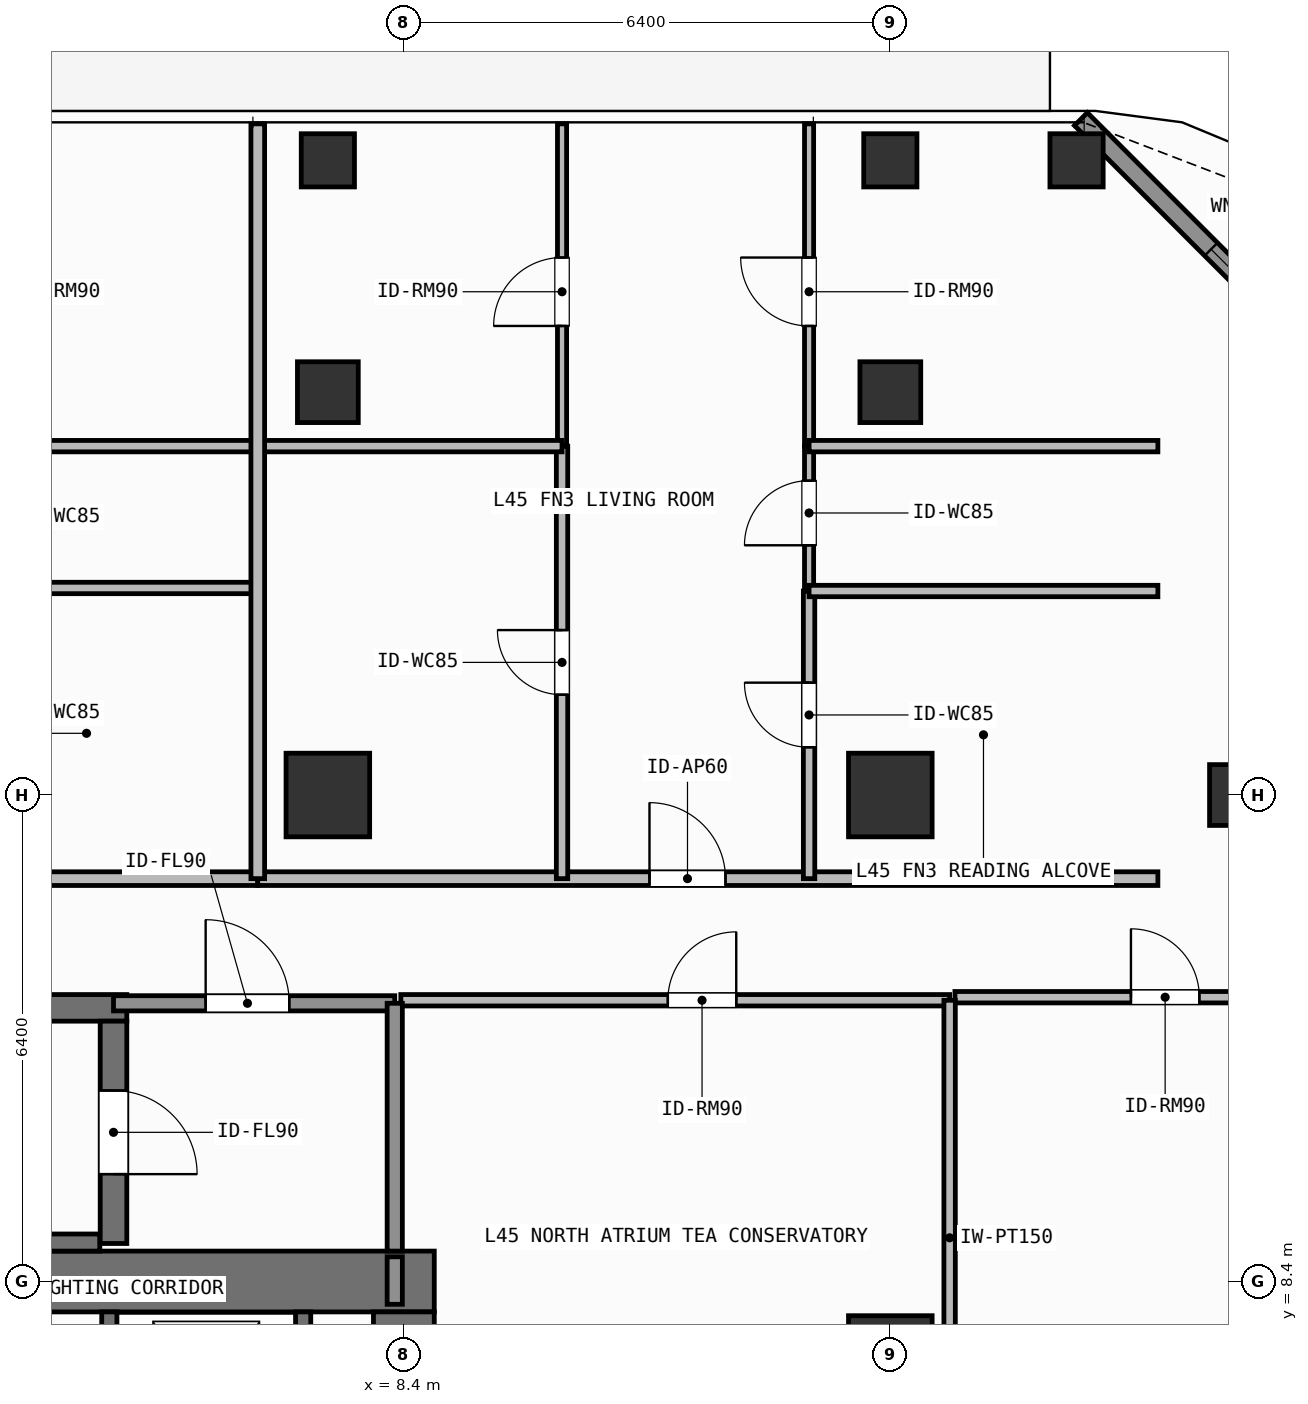
"""IFC4 building model, lengths in metres.
Left out: names, types, materials, properties, quantities, classifications, styles, units other than length and angle.
Written with IfcOpenShell. Run it as: python <this file> out.ifc"""

import sys

from ifc_helpers import new_model, si_unit, direction, frame, frame_2d, origin, origin_2d, place, context, subcontext, project, spatial, rectangle, hollow_rectangle, extrude, element, fill, save


model = new_model("IFC4")
c1 = context("Model", 3, precision=1e-05, world=origin(), true_north=direction((0.0, 1.0)))
c2 = subcontext(c1, "Body", "Model", "MODEL_VIEW")
j1 = project(units=[si_unit("LENGTHUNIT", "METRE"), si_unit("PLANEANGLEUNIT", "RADIAN")], contexts=[c1])
p1 = place(None, origin())
s1 = spatial("IfcSite", under=j1, at=p1, CompositionType="ELEMENT")
p2 = place(p1, origin())
s2 = spatial("IfcBuilding", under=s1, at=p2, CompositionType="ELEMENT")
p3 = place(p2, frame((0.0, 0.0, 183.6)))
s3 = spatial("IfcBuildingStorey", under=s2, at=p3, CompositionType="ELEMENT", Elevation=183.6)
p4 = place(p3, frame((-7.55, 8.4, 0.0), z_axis=(0.0, 0.0, 1.0), x_axis=(1.0, 0.0, 0.0)))
e1 = element("IfcWall", 1, at=p4, inside=s3, PredefinedType="SHEAR", context=c2, shape_type="SweptSolid", body=[
    extrude(rectangle(XDim=16.35, YDim=0.8, at=frame_2d((8.175, 0.0))), origin(), (0.0, 0.0, 1.0), 3.9),
])
p5 = place(p3, frame((8.4, 5.825, 0.0), z_axis=(0.0, 0.0, 1.0), x_axis=(0.0, 1.0, 0.0)))
e2 = element("IfcWall", 2, at=p5, inside=s3, PredefinedType="SHEAR", context=c2, shape_type="SweptSolid", body=[
    extrude(rectangle(XDim=2.175, YDim=0.8, at=frame_2d((1.087, 0.0))), origin(), (0.0, 0.0, 1.0), 3.9),
])
p6 = place(p3, frame((-2.555, 12.0, 0.0), z_axis=(0.0, 0.0, 1.0), x_axis=(1.0, 0.0, 0.0)))
e3 = element("IfcWall", 3, at=p6, inside=s3, PredefinedType="SHEAR", context=c2, shape_type="SweptSolid", body=[
    extrude(rectangle(XDim=7.31, YDim=0.35, at=frame_2d((3.655, 0.0))), origin(), (0.0, 0.0, 1.0), 3.9),
])
p7 = place(p3, frame((-2.2, 8.913, 0.0), z_axis=(0.0, 0.0, 1.0), x_axis=(1.0, 0.0, 0.0)))
e4 = element("IfcWall", 4, at=p7, inside=s3, PredefinedType="SHEAR", context=c2, shape_type="SweptSolid", body=[
    extrude(rectangle(XDim=6.6, YDim=0.225, at=frame_2d((3.3, 0.0))), origin(), (0.0, 0.0, 1.0), 3.9),
])
p8 = place(p3, frame((4.58, 11.825, 0.0), z_axis=(0.0, 0.0, 1.0), x_axis=(0.0, -1.0, 0.0)))
e5 = element("IfcWall", 5, at=p8, inside=s3, PredefinedType="SHEAR", context=c2, shape_type="SweptSolid", body=[
    extrude(rectangle(XDim=2.925, YDim=0.35, at=frame_2d((1.462, 0.0))), origin(), (0.0, 0.0, 1.0), 3.9),
])
p9 = place(p8, frame((0.913, 0.0, 0.0)))
e6 = element("IfcOpeningElement", 6, at=p9, cuts=e5, PredefinedType="OPENING", context=c2, shape_type="SweptSolid", body=[
    extrude(rectangle(XDim=1.1, YDim=2.15, at=frame_2d((0.55, 1.075))), frame((0.0, 0.185, 0.0), z_axis=(0.0, -1.0, 0.0), x_axis=(1.0, 0.0, 0.0)), (0.0, 0.0, 1.0), 0.37),
])
for number, where, z_axis, x_axis in (
    (7, (7.4, 14.8, 0.0), (0.0, 0.0, 1.0), (1.0, 0.0, 0.0)),
    (8, (14.8, 14.8, 0.0), (0.0, 0.0, 1.0), (1.0, 0.0, 0.0)),
    (9, (14.8, 7.4, 0.0), (0.0, 0.0, 1.0), (1.0, 0.0, 0.0)),
):
    element("IfcColumn", number, at=place(p3, frame(where, z_axis=z_axis, x_axis=x_axis)), inside=s3, PredefinedType="COLUMN", context=c2, shape_type="SweptSolid", body=[
        extrude(rectangle(XDim=1.1, YDim=1.1, at=origin_2d()), origin(), (0.0, 0.0, 1.0), 3.9),
    ])
for number, where, z_axis, x_axis in (
    (10, (19.4, 14.8, 0.0), (0.0, 0.0, 1.0), (1.0, 0.0, 0.0)),
    (11, (7.4, 20.1, 0.0), (0.0, 0.0, 1.0), (1.0, 0.0, 0.0)),
    (12, (14.8, 20.1, 0.0), (0.0, 0.0, 1.0), (1.0, 0.0, 0.0)),
):
    element("IfcColumn", number, at=place(p3, frame(where, z_axis=z_axis, x_axis=x_axis)), inside=s3, PredefinedType="COLUMN", context=c2, shape_type="SweptSolid", body=[
        extrude(hollow_rectangle(XDim=0.8, YDim=0.8, WallThickness=0.036, at=origin_2d()), origin(), (0.0, 0.0, 1.0), 3.9),
    ])
for number, where, z_axis, x_axis in (
    (13, (17.25, 23.15, 0.0), (0.0, 0.0, 1.0), (1.0, 0.0, 0.0)),
    (14, (7.4, 23.15, 0.0), (0.0, 0.0, 1.0), (1.0, 0.0, 0.0)),
    (15, (14.8, 23.15, 0.0), (0.0, 0.0, 1.0), (1.0, 0.0, 0.0)),
):
    element("IfcColumn", number, at=place(p3, frame(where, z_axis=z_axis, x_axis=x_axis)), inside=s3, PredefinedType="COLUMN", context=c2, shape_type="SweptSolid", body=[
        extrude(hollow_rectangle(XDim=0.7, YDim=0.7, WallThickness=0.032, at=origin_2d()), origin(), (0.0, 0.0, 1.0), 3.9),
    ])
p10 = place(p3, frame((17.308, 23.692, 0.0), z_axis=(0.0, 0.0, 1.0), x_axis=(0.707106781187, -0.707106781187, 0.0)))
e16 = element("IfcWall", 16, at=p10, inside=s3, PredefinedType="SOLIDWALL", context=c2, shape_type="SweptSolid", body=[
    extrude(rectangle(XDim=6.343, YDim=0.24, at=frame_2d((3.171, 0.0))), origin(), (0.0, 0.0, 1.0), 3.68),
])
p11 = place(p10, frame((2.421, 0.0, 0.8)))
e17 = element("IfcOpeningElement", 17, at=p11, cuts=e16, PredefinedType="OPENING", context=c2, shape_type="SweptSolid", body=[
    extrude(rectangle(XDim=1.5, YDim=1.85, at=frame_2d((0.75, 0.925))), frame((0.0, 0.13, 0.0), z_axis=(0.0, -1.0, 0.0), x_axis=(1.0, 0.0, 0.0)), (0.0, 0.0, 1.0), 0.26),
])
p12 = place(p3, frame((4.525, 5.825, 0.0), z_axis=(0.0, 0.0, 1.0), x_axis=(0.0, 1.0, 0.0)))
e18 = element("IfcWall", 18, at=p12, inside=s3, PredefinedType="SHEAR", context=c2, shape_type="SweptSolid", body=[
    extrude(rectangle(XDim=2.175, YDim=0.2, at=frame_2d((1.087, 0.0))), origin(), (0.0, 0.0, 1.0), 3.68),
])
p13 = place(p12, frame((0.425, 0.0, 0.0)))
e19 = element("IfcOpeningElement", 19, at=p13, cuts=e18, PredefinedType="OPENING", context=c2, shape_type="SweptSolid", body=[
    extrude(rectangle(XDim=1.1, YDim=2.2, at=frame_2d((0.55, 1.1))), frame((0.0, 0.11, 0.0), z_axis=(0.0, -1.0, 0.0), x_axis=(1.0, 0.0, 0.0)), (0.0, 0.0, 1.0), 0.22),
])
p14 = place(p3, frame((7.075, 5.825, 0.0), z_axis=(0.0, 0.0, 1.0), x_axis=(0.0, 1.0, 0.0)))
e20 = element("IfcWall", 20, at=p14, inside=s3, PredefinedType="SHEAR", context=c2, shape_type="SweptSolid", body=[
    extrude(rectangle(XDim=2.175, YDim=0.2, at=frame_2d((1.087, 0.0))), origin(), (0.0, 0.0, 1.0), 3.68),
])
p15 = place(p3, frame((4.58, 12.06, 0.0), z_axis=(0.0, 0.0, 1.0), x_axis=(1.0, 0.0, 0.0)))
e21 = element("IfcWall", 21, at=p15, inside=s3, PredefinedType="SOLIDWALL", context=c2, shape_type="SweptSolid", body=[
    extrude(rectangle(XDim=3.7, YDim=0.2, at=frame_2d((1.85, 0.0))), origin(), (0.0, 0.0, 1.0), 3.68),
])
p16 = place(p15, frame((1.212, 0.0, 0.0)))
e22 = element("IfcOpeningElement", 22, at=p16, cuts=e21, PredefinedType="OPENING", context=c2, shape_type="SweptSolid", body=[
    extrude(rectangle(XDim=1.1, YDim=2.15, at=frame_2d((0.55, 1.075))), frame((0.0, 0.11, 0.0), z_axis=(0.0, -1.0, 0.0), x_axis=(1.0, 0.0, 0.0)), (0.0, 0.0, 1.0), 0.22),
])
p17 = place(p3, frame((8.36, 12.1, 0.0), z_axis=(0.0, 0.0, 1.0), x_axis=(1.0, 0.0, 0.0)))
e23 = element("IfcWall", 23, at=p17, inside=s3, PredefinedType="PARTITIONING", context=c2, shape_type="SweptSolid", body=[
    extrude(rectangle(XDim=7.22, YDim=0.15, at=frame_2d((3.61, 0.0))), origin(), (0.0, 0.0, 1.0), 3.68),
])
p18 = place(p17, frame((3.513, 0.0, 0.0)))
e24 = element("IfcOpeningElement", 24, at=p18, cuts=e23, PredefinedType="OPENING", context=c2, shape_type="SweptSolid", body=[
    extrude(rectangle(XDim=0.9, YDim=2.1, at=frame_2d((0.45, 1.05))), frame((0.0, 0.085, 0.0), z_axis=(0.0, -1.0, 0.0), x_axis=(1.0, 0.0, 0.0)), (0.0, 0.0, 1.0), 0.17),
])
p19 = place(p3, frame((-12.28, 13.7, 0.0), z_axis=(0.0, 0.0, 1.0), x_axis=(1.0, 0.0, 0.0)))
e25 = element("IfcWall", 25, at=p19, inside=s3, PredefinedType="PARTITIONING", context=c2, shape_type="SweptSolid", body=[
    extrude(rectangle(XDim=18.758, YDim=0.18, at=frame_2d((9.379, 0.0))), origin(), (0.0, 0.0, 1.0), 3.68),
])
p20 = place(p19, frame((10.048, 0.0, 0.0)))
e26 = element("IfcOpeningElement", 26, at=p20, cuts=e25, PredefinedType="OPENING", context=c2, shape_type="SweptSolid", body=[
    extrude(rectangle(XDim=1.0, YDim=2.2, at=frame_2d((0.5, 1.1))), frame((0.0, 0.1, 0.0), z_axis=(0.0, -1.0, 0.0), x_axis=(1.0, 0.0, 0.0)), (0.0, 0.0, 1.0), 0.2),
])
p21 = place(p3, frame((6.478, 13.7, 0.0), z_axis=(0.0, 0.0, 1.0), x_axis=(1.0, 0.0, 0.0)))
e27 = element("IfcWall", 27, at=p21, inside=s3, PredefinedType="PARTITIONING", context=c2, shape_type="SweptSolid", body=[
    extrude(rectangle(XDim=11.842, YDim=0.18, at=frame_2d((5.921, 0.0))), origin(), (0.0, 0.0, 1.0), 3.68),
])
p22 = place(p21, frame((5.154, 0.0, 0.0)))
e28 = element("IfcOpeningElement", 28, at=p22, cuts=e27, PredefinedType="OPENING", context=c2, shape_type="SweptSolid", body=[
    extrude(rectangle(XDim=1.0, YDim=2.2, at=frame_2d((0.5, 1.1))), frame((0.0, 0.1, 0.0), z_axis=(0.0, -1.0, 0.0), x_axis=(1.0, 0.0, 0.0)), (0.0, 0.0, 1.0), 0.2),
])
p23 = place(p3, frame((10.481, 13.7, 0.0), z_axis=(0.0, 0.0, 1.0), x_axis=(0.0, 1.0, 0.0)))
e29 = element("IfcWall", 29, at=p23, inside=s3, PredefinedType="PARTITIONING", context=c2, shape_type="SweptSolid", body=[
    extrude(rectangle(XDim=5.69, YDim=0.15, at=frame_2d((2.845, 0.0))), origin(), (0.0, 0.0, 1.0), 3.68),
])
p24 = place(p23, frame((2.42, 0.0, 0.0)))
e30 = element("IfcOpeningElement", 30, at=p24, cuts=e29, PredefinedType="OPENING", context=c2, shape_type="SweptSolid", body=[
    extrude(rectangle(XDim=0.85, YDim=2.1, at=frame_2d((0.425, 1.05))), frame((0.0, 0.085, 0.0), z_axis=(0.0, -1.0, 0.0), x_axis=(1.0, 0.0, 0.0)), (0.0, 0.0, 1.0), 0.17),
])
p25 = place(p3, frame((10.481, 19.39, 0.0), z_axis=(0.0, 0.0, 1.0), x_axis=(0.0, 1.0, 0.0)))
e31 = element("IfcWall", 31, at=p25, inside=s3, PredefinedType="PARTITIONING", context=c2, shape_type="SweptSolid", body=[
    extrude(rectangle(XDim=4.24, YDim=0.12, at=frame_2d((2.12, 0.0))), origin(), (0.0, 0.0, 1.0), 3.68),
])
p26 = place(p25, frame((1.581, 0.0, 0.0)))
e32 = element("IfcOpeningElement", 32, at=p26, cuts=e31, PredefinedType="OPENING", context=c2, shape_type="SweptSolid", body=[
    extrude(rectangle(XDim=0.9, YDim=2.1, at=frame_2d((0.45, 1.05))), frame((0.0, 0.07, 0.0), z_axis=(0.0, -1.0, 0.0), x_axis=(1.0, 0.0, 0.0)), (0.0, 0.0, 1.0), 0.14),
])
p27 = place(p3, frame((13.731, 13.7, 0.0), z_axis=(0.0, 0.0, 1.0), x_axis=(0.0, 1.0, 0.0)))
e33 = element("IfcWall", 33, at=p27, inside=s3, PredefinedType="PARTITIONING", context=c2, shape_type="SweptSolid", body=[
    extrude(rectangle(XDim=3.784, YDim=0.15, at=frame_2d((1.892, 0.0))), origin(), (0.0, 0.0, 1.0), 3.68),
])
p28 = place(p27, frame((1.729, 0.0, 0.0)))
e34 = element("IfcOpeningElement", 34, at=p28, cuts=e33, PredefinedType="OPENING", context=c2, shape_type="SweptSolid", body=[
    extrude(rectangle(XDim=0.85, YDim=2.1, at=frame_2d((0.425, 1.05))), frame((0.0, 0.085, 0.0), z_axis=(0.0, -1.0, 0.0), x_axis=(1.0, 0.0, 0.0)), (0.0, 0.0, 1.0), 0.17),
])
p29 = place(p3, frame((13.731, 17.484, 0.0), z_axis=(0.0, 0.0, 1.0), x_axis=(0.0, 1.0, 0.0)))
e35 = element("IfcWall", 35, at=p29, inside=s3, PredefinedType="PARTITIONING", context=c2, shape_type="SweptSolid", body=[
    extrude(rectangle(XDim=1.906, YDim=0.12, at=frame_2d((0.953, 0.0))), origin(), (0.0, 0.0, 1.0), 3.68),
])
p30 = place(p29, frame((0.602, 0.0, 0.0)))
e36 = element("IfcOpeningElement", 36, at=p30, cuts=e35, PredefinedType="OPENING", context=c2, shape_type="SweptSolid", body=[
    extrude(rectangle(XDim=0.85, YDim=2.1, at=frame_2d((0.425, 1.05))), frame((0.0, 0.07, 0.0), z_axis=(0.0, -1.0, 0.0), x_axis=(1.0, 0.0, 0.0)), (0.0, 0.0, 1.0), 0.14),
])
p31 = place(p3, frame((13.731, 19.39, 0.0), z_axis=(0.0, 0.0, 1.0), x_axis=(0.0, 1.0, 0.0)))
e37 = element("IfcWall", 37, at=p31, inside=s3, PredefinedType="PARTITIONING", context=c2, shape_type="SweptSolid", body=[
    extrude(rectangle(XDim=4.24, YDim=0.12, at=frame_2d((2.12, 0.0))), origin(), (0.0, 0.0, 1.0), 3.68),
])
p32 = place(p31, frame((1.581, 0.0, 0.0)))
e38 = element("IfcOpeningElement", 38, at=p32, cuts=e37, PredefinedType="OPENING", context=c2, shape_type="SweptSolid", body=[
    extrude(rectangle(XDim=0.9, YDim=2.1, at=frame_2d((0.45, 1.05))), frame((0.0, 0.07, 0.0), z_axis=(0.0, -1.0, 0.0), x_axis=(1.0, 0.0, 0.0)), (0.0, 0.0, 1.0), 0.14),
])
p33 = place(p3, frame((15.65, 12.14, 0.0), z_axis=(0.0, 0.0, 1.0), x_axis=(1.0, 0.0, 0.0)))
e39 = element("IfcWall", 39, at=p33, inside=s3, PredefinedType="PARTITIONING", context=c2, shape_type="SweptSolid", body=[
    extrude(rectangle(XDim=6.07, YDim=0.15, at=frame_2d((3.035, 0.0))), origin(), (0.0, 0.0, 1.0), 3.68),
])
p34 = place(p33, frame((2.316, 0.0, 0.0)))
e40 = element("IfcOpeningElement", 40, at=p34, cuts=e39, PredefinedType="OPENING", context=c2, shape_type="SweptSolid", body=[
    extrude(rectangle(XDim=0.9, YDim=2.1, at=frame_2d((0.45, 1.05))), frame((0.0, 0.085, 0.0), z_axis=(0.0, -1.0, 0.0), x_axis=(1.0, 0.0, 0.0)), (0.0, 0.0, 1.0), 0.17),
])
p35 = place(p3, frame((8.28, 8.8, 0.0), z_axis=(0.0, 0.0, 1.0), x_axis=(0.0, 1.0, 0.0)))
e41 = element("IfcWall", 41, at=p35, inside=s3, PredefinedType="SOLIDWALL", context=c2, shape_type="SweptSolid", body=[
    extrude(rectangle(XDim=3.26, YDim=0.2, at=frame_2d((1.63, 0.0))), origin(), (0.0, 0.0, 1.0), 3.68),
])
p36 = place(p3, frame((8.28, 8.1, 0.0), z_axis=(0.0, 0.0, 1.0), x_axis=(0.0, 1.0, 0.0)))
e42 = element("IfcWall", 42, at=p36, inside=s3, PredefinedType="SOLIDWALL", context=c2, shape_type="SweptSolid", body=[
    extrude(rectangle(XDim=0.625, YDim=0.2, at=frame_2d((0.312, 0.0))), origin(), (0.0, 0.0, 1.0), 3.68),
])
p37 = place(p3, frame((15.58, 5.85, 0.0), z_axis=(0.0, 0.0, 1.0), x_axis=(0.0, 1.0, 0.0)))
e43 = element("IfcWall", 43, at=p37, inside=s3, PredefinedType="PARTITIONING", context=c2, shape_type="SweptSolid", body=[
    extrude(rectangle(XDim=6.25, YDim=0.15, at=frame_2d((3.125, 0.0))), origin(), (0.0, 0.0, 1.0), 3.68),
])
for number, where, z_axis, x_axis in (
    (44, (1.972, 17.524, 0.0), (0.0, 0.0, 1.0), (1.0, 0.0, 0.0)),
    (45, (1.972, 19.39, 0.0), (0.0, 0.0, 1.0), (1.0, 0.0, 0.0)),
):
    element("IfcWall", number, at=place(p3, frame(where, z_axis=z_axis, x_axis=x_axis)), inside=s3, PredefinedType="PARTITIONING", context=c2, shape_type="SweptSolid", body=[
        extrude(rectangle(XDim=4.506, YDim=0.15, at=frame_2d((2.253, 0.0))), origin(), (0.0, 0.0, 1.0), 3.68),
    ])
p38 = place(p3, frame((6.478, 19.39, 0.0), z_axis=(0.0, 0.0, 1.0), x_axis=(1.0, 0.0, 0.0)))
e46 = element("IfcWall", 46, at=p38, inside=s3, PredefinedType="PARTITIONING", context=c2, shape_type="SweptSolid", body=[
    extrude(rectangle(XDim=4.003, YDim=0.15, at=frame_2d((2.001, 0.0))), origin(), (0.0, 0.0, 1.0), 3.68),
])
for number, where, z_axis, x_axis in (
    (47, (13.731, 17.484, 0.0), (0.0, 0.0, 1.0), (1.0, 0.0, 0.0)),
    (48, (13.731, 19.39, 0.0), (0.0, 0.0, 1.0), (1.0, 0.0, 0.0)),
):
    element("IfcWall", number, at=place(p3, frame(where, z_axis=z_axis, x_axis=x_axis)), inside=s3, PredefinedType="PARTITIONING", context=c2, shape_type="SweptSolid", body=[
        extrude(rectangle(XDim=4.589, YDim=0.15, at=frame_2d((2.294, 0.0))), origin(), (0.0, 0.0, 1.0), 3.68),
    ])
p39 = place(p3, frame((6.478, 13.7, 0.0), z_axis=(0.0, 0.0, 1.0), x_axis=(0.0, 1.0, 0.0)))
e49 = element("IfcWall", 49, at=p39, inside=s3, PredefinedType="PARTITIONING", context=c2, shape_type="SweptSolid", body=[
    extrude(rectangle(XDim=9.93, YDim=0.18, at=frame_2d((4.965, 0.0))), origin(), (0.0, 0.0, 1.0), 3.68),
])
p40 = place(p11, origin())
e50 = element("IfcWindow", 50, at=p40, inside=s3, PartitioningType="SINGLE_PANEL", PredefinedType="WINDOW", context=c2, shape_type="SweptSolid", body=[
    extrude(rectangle(XDim=1.5, YDim=1.85, at=frame_2d((0.75, 0.925))), frame((0.0, 0.03, 0.0), z_axis=(0.0, -1.0, 0.0), x_axis=(1.0, 0.0, 0.0)), (0.0, 0.0, 1.0), 0.06),
])
fill(e17, e50)
p41 = place(p9, origin())
e51 = element("IfcDoor", 51, at=p41, inside=s3, OperationType="SINGLE_SWING_RIGHT", PredefinedType="DOOR", context=c2, shape_type="SweptSolid", body=[
    extrude(rectangle(XDim=1.1, YDim=2.15, at=frame_2d((0.55, 1.075))), frame((0.0, 0.025, 0.0), z_axis=(0.0, -1.0, 0.0), x_axis=(1.0, 0.0, 0.0)), (0.0, 0.0, 1.0), 0.05),
])
fill(e6, e51)
p42 = place(p16, origin())
e52 = element("IfcDoor", 52, at=p42, inside=s3, OperationType="SINGLE_SWING_LEFT", PredefinedType="DOOR", context=c2, shape_type="SweptSolid", body=[
    extrude(rectangle(XDim=1.1, YDim=2.15, at=frame_2d((0.55, 1.075))), frame((0.0, 0.025, 0.0), z_axis=(0.0, -1.0, 0.0), x_axis=(1.0, 0.0, 0.0)), (0.0, 0.0, 1.0), 0.05),
])
fill(e22, e52)
p43 = place(p18, origin())
e53 = element("IfcDoor", 53, at=p43, inside=s3, OperationType="SINGLE_SWING_RIGHT", PredefinedType="DOOR", context=c2, shape_type="SweptSolid", body=[
    extrude(rectangle(XDim=0.9, YDim=2.1, at=frame_2d((0.45, 1.05))), frame((0.0, 0.025, 0.0), z_axis=(0.0, -1.0, 0.0), x_axis=(1.0, 0.0, 0.0)), (0.0, 0.0, 1.0), 0.05),
])
fill(e24, e53)
p44 = place(p22, origin())
e54 = element("IfcDoor", 54, at=p44, inside=s3, OperationType="SINGLE_SWING_LEFT", PredefinedType="DOOR", context=c2, shape_type="SweptSolid", body=[
    extrude(rectangle(XDim=1.0, YDim=2.2, at=frame_2d((0.5, 1.1))), frame((0.0, 0.025, 0.0), z_axis=(0.0, -1.0, 0.0), x_axis=(1.0, 0.0, 0.0)), (0.0, 0.0, 1.0), 0.05),
])
fill(e28, e54)
p45 = place(p24, origin())
e55 = element("IfcDoor", 55, at=p45, inside=s3, OperationType="SINGLE_SWING_RIGHT", PredefinedType="DOOR", context=c2, shape_type="SweptSolid", body=[
    extrude(rectangle(XDim=0.85, YDim=2.1, at=frame_2d((0.425, 1.05))), frame((0.0, 0.025, 0.0), z_axis=(0.0, -1.0, 0.0), x_axis=(1.0, 0.0, 0.0)), (0.0, 0.0, 1.0), 0.05),
])
fill(e30, e55)
p46 = place(p26, origin())
e56 = element("IfcDoor", 56, at=p46, inside=s3, OperationType="SINGLE_SWING_LEFT", PredefinedType="DOOR", context=c2, shape_type="SweptSolid", body=[
    extrude(rectangle(XDim=0.9, YDim=2.1, at=frame_2d((0.45, 1.05))), frame((0.0, 0.025, 0.0), z_axis=(0.0, -1.0, 0.0), x_axis=(1.0, 0.0, 0.0)), (0.0, 0.0, 1.0), 0.05),
])
fill(e32, e56)
p47 = place(p28, origin())
e57 = element("IfcDoor", 57, at=p47, inside=s3, OperationType="SINGLE_SWING_RIGHT", PredefinedType="DOOR", context=c2, shape_type="SweptSolid", body=[
    extrude(rectangle(XDim=0.85, YDim=2.1, at=frame_2d((0.425, 1.05))), frame((0.0, 0.025, 0.0), z_axis=(0.0, -1.0, 0.0), x_axis=(1.0, 0.0, 0.0)), (0.0, 0.0, 1.0), 0.05),
])
fill(e34, e57)
p48 = place(p30, origin())
e58 = element("IfcDoor", 58, at=p48, inside=s3, OperationType="SINGLE_SWING_LEFT", PredefinedType="DOOR", context=c2, shape_type="SweptSolid", body=[
    extrude(rectangle(XDim=0.85, YDim=2.1, at=frame_2d((0.425, 1.05))), frame((0.0, 0.025, 0.0), z_axis=(0.0, -1.0, 0.0), x_axis=(1.0, 0.0, 0.0)), (0.0, 0.0, 1.0), 0.05),
])
fill(e36, e58)
p49 = place(p32, origin())
e59 = element("IfcDoor", 59, at=p49, inside=s3, OperationType="SINGLE_SWING_RIGHT", PredefinedType="DOOR", context=c2, shape_type="SweptSolid", body=[
    extrude(rectangle(XDim=0.9, YDim=2.1, at=frame_2d((0.45, 1.05))), frame((0.0, 0.025, 0.0), z_axis=(0.0, -1.0, 0.0), x_axis=(1.0, 0.0, 0.0)), (0.0, 0.0, 1.0), 0.05),
])
fill(e38, e59)
p50 = place(p34, origin())
e60 = element("IfcDoor", 60, at=p50, inside=s3, OperationType="SINGLE_SWING_LEFT", PredefinedType="DOOR", context=c2, shape_type="SweptSolid", body=[
    extrude(rectangle(XDim=0.9, YDim=2.1, at=frame_2d((0.45, 1.05))), frame((0.0, 0.025, 0.0), z_axis=(0.0, -1.0, 0.0), x_axis=(1.0, 0.0, 0.0)), (0.0, 0.0, 1.0), 0.05),
])
fill(e40, e60)
save(model, sys.argv[1])
